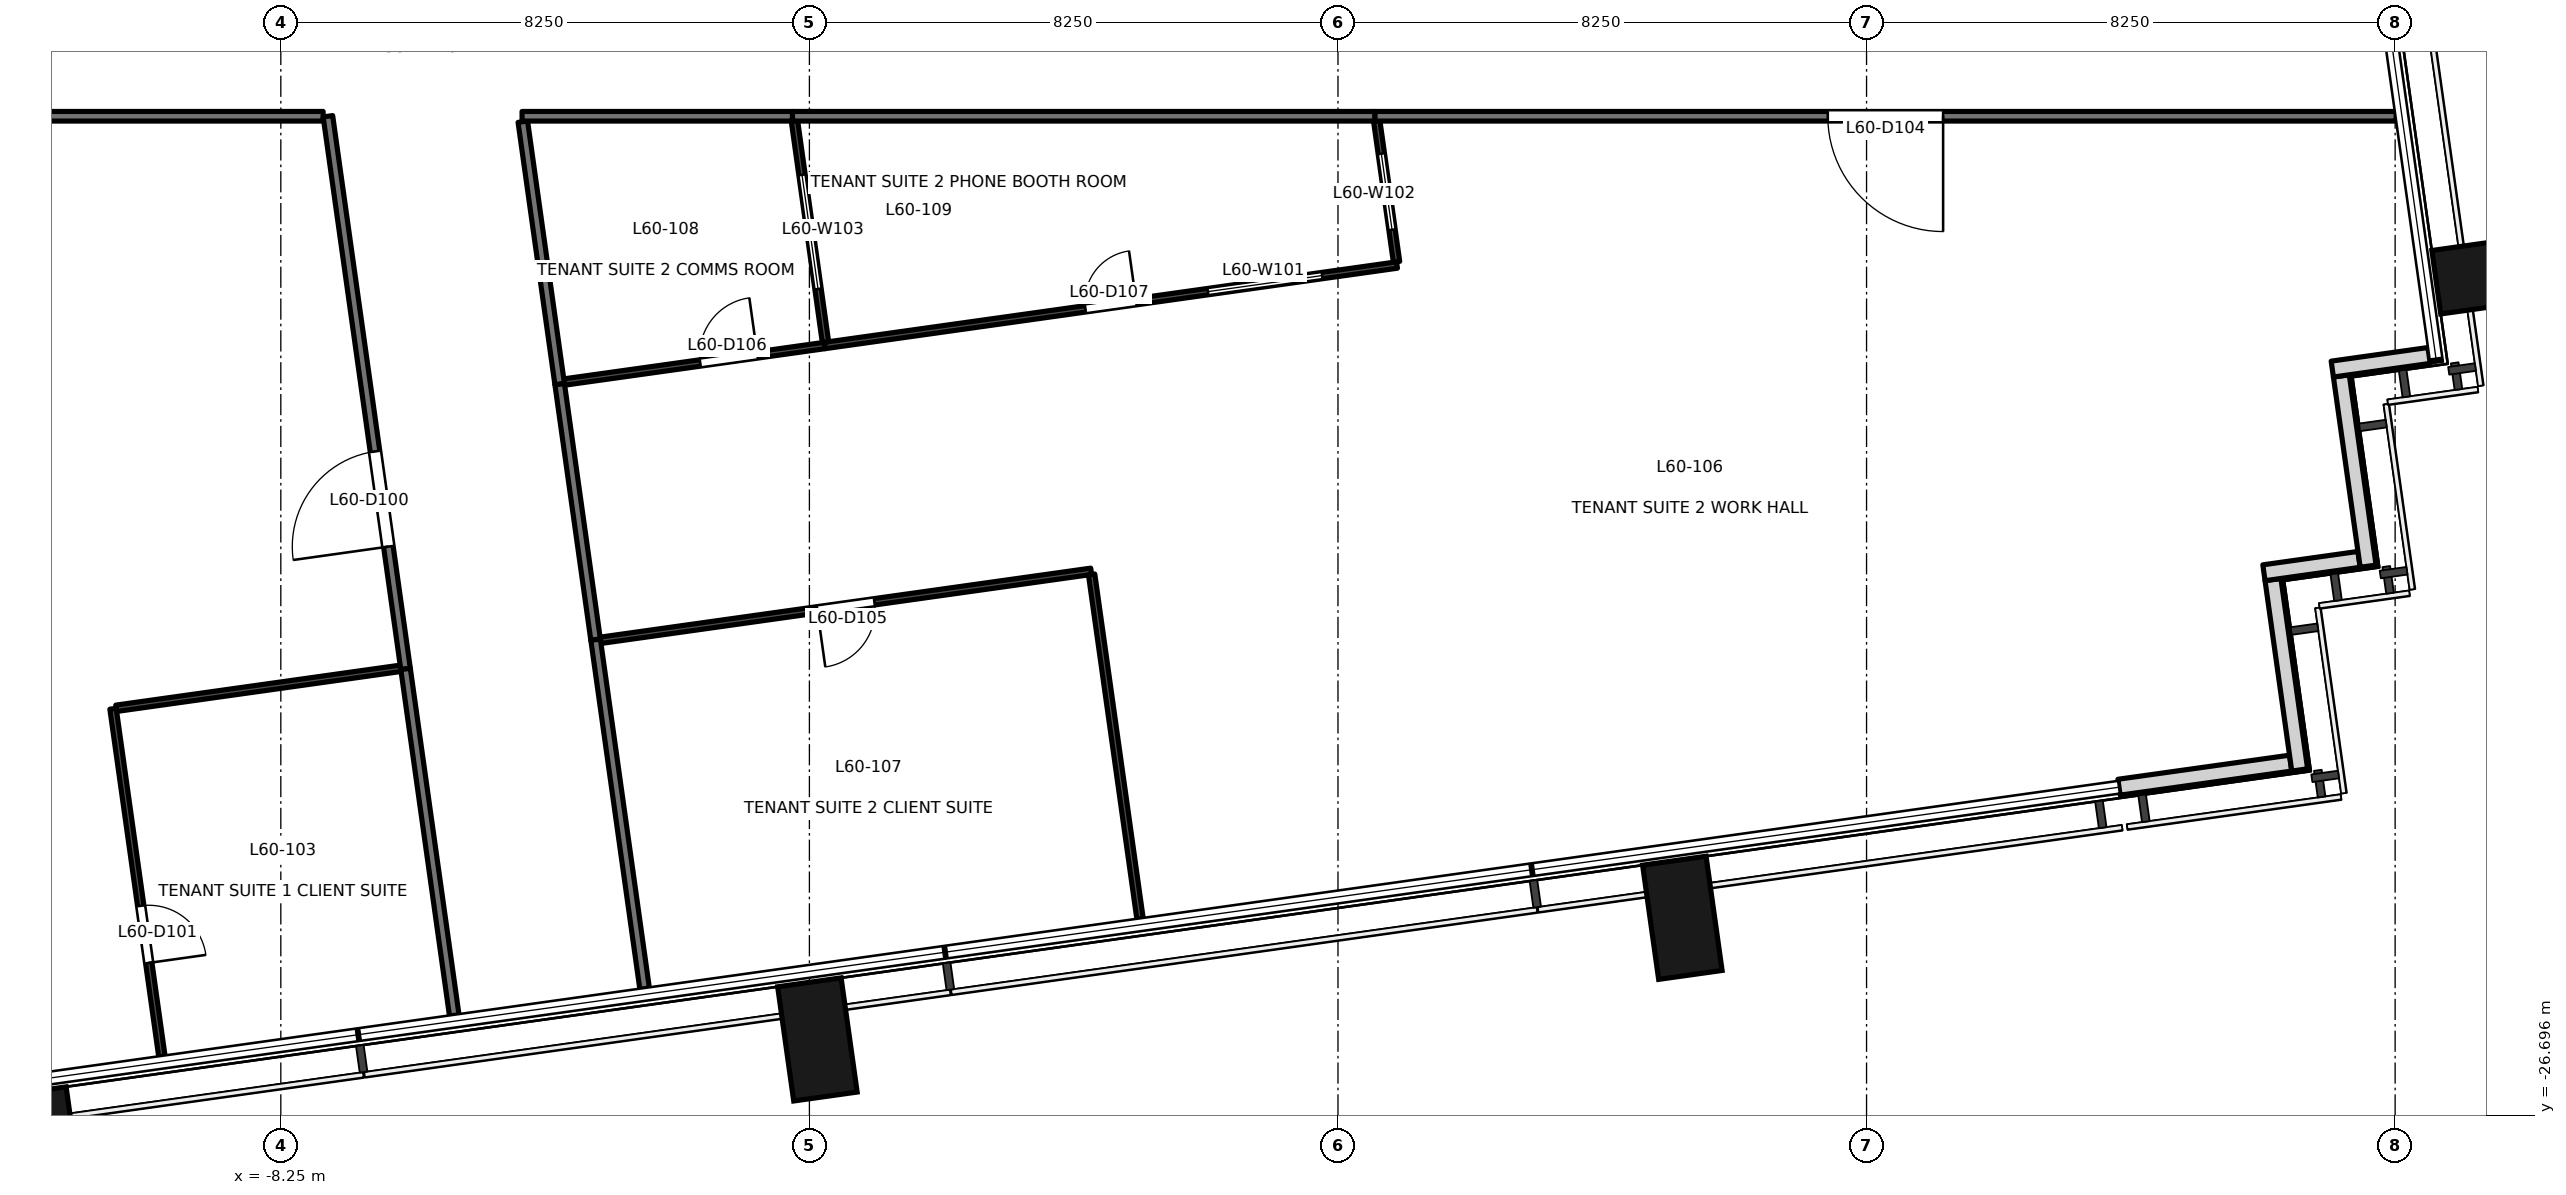
"""IFC4 building model, lengths in metres.
Left out: names, types, materials, properties, quantities, classifications, styles, units other than length and angle.
Written with IfcOpenShell. Run it as: python <this file> out.ifc"""

import sys

from ifc_helpers import new_model, si_unit, direction, frame, frame_2d, origin, origin_2d, place, context, subcontext, project, spatial, rectangle, extrude, element, fill, save


model = new_model("IFC4")
c1 = context("Model", 3, precision=1e-05, world=origin(), true_north=direction((0.0, 1.0)))
c2 = subcontext(c1, "Body", "Model", "MODEL_VIEW")
j1 = project(units=[si_unit("LENGTHUNIT", "METRE"), si_unit("PLANEANGLEUNIT", "RADIAN")], contexts=[c1])
p1 = place(None, origin())
s1 = spatial("IfcSite", under=j1, at=p1, CompositionType="ELEMENT")
p2 = place(p1, origin())
s2 = spatial("IfcBuilding", under=s1, at=p2, CompositionType="ELEMENT")
p3 = place(p2, frame((0.0, 0.0, 262.9)))
s3 = spatial("IfcBuildingStorey", under=s2, at=p3, CompositionType="ELEMENT", Elevation=262.9)
for number, where, z_axis, x_axis in (
    (1, (-11.971, -27.209, -0.2), (0.0, 0.0, 1.0), (0.99, 0.139, 0.0)),
    (2, (0.125, -25.508, -0.2), (0.0, 0.0, 1.0), (0.99, 0.139, 0.0)),
    (3, (13.625, -23.61, -0.2), (0.0, 0.0, 1.0), (0.99, 0.139, 0.0)),
    (4, (26.284, -13.565, -0.2), (0.0, 0.0, 1.0), (-0.139, 0.99, 0.0)),
):
    element("IfcColumn", number, at=place(p3, frame(where, z_axis=z_axis, x_axis=x_axis)), inside=s3, PredefinedType="COLUMN", context=c2, shape_type="SweptSolid", body=[
        extrude(rectangle(XDim=1.0, YDim=1.8, at=origin_2d()), origin(), (0.0, 0.0, 1.0), 3.9),
    ])
p4 = place(p3, frame((20.44, -21.572, 0.0), z_axis=(0.0, 0.0, 1.0), x_axis=(0.990293105353, 0.138994839796, 0.0)))
e5 = element("IfcWall", 5, at=p4, inside=s3, PredefinedType="SOLIDWALL", context=c2, shape_type="SweptSolid", body=[
    extrude(rectangle(XDim=2.705, YDim=0.25, at=frame_2d((1.353, 0.0))), origin(), (0.0, 0.0, 1.0), 3.7),
])
p5 = place(p3, frame((23.26, -21.302, 0.0), z_axis=(0.0, 0.0, 1.0), x_axis=(-0.138994228812, 0.990293191109, 0.0)))
e6 = element("IfcWall", 6, at=p5, inside=s3, PredefinedType="SOLIDWALL", context=c2, shape_type="SweptSolid", body=[
    extrude(rectangle(XDim=3.0, YDim=0.25, at=frame_2d((1.5, 0.0))), origin(), (0.0, 0.0, 1.0), 3.7),
])
p6 = place(p3, frame((22.702, -18.225, 0.0), z_axis=(0.0, 0.0, 1.0), x_axis=(0.990243596651, 0.13934711799, 0.0)))
e7 = element("IfcWall", 7, at=p6, inside=s3, PredefinedType="SOLIDWALL", context=c2, shape_type="SweptSolid", body=[
    extrude(rectangle(XDim=1.5, YDim=0.25, at=frame_2d((0.75, 0.0))), origin(), (0.0, 0.0, 1.0), 3.7),
])
p7 = place(p3, frame((24.328, -18.122, 0.0), z_axis=(0.0, 0.0, 1.0), x_axis=(-0.139358350296, 0.990242015975, 0.0)))
e8 = element("IfcWall", 8, at=p7, inside=s3, PredefinedType="SOLIDWALL", context=c2, shape_type="SweptSolid", body=[
    extrude(rectangle(XDim=2.999, YDim=0.25, at=frame_2d((1.5, 0.0))), origin(), (0.0, 0.0, 1.0), 3.7),
])
p8 = place(p3, frame((23.769, -15.046, 0.0), z_axis=(0.0, 0.0, 1.0), x_axis=(0.990260716096, 0.139225407725, 0.0)))
e9 = element("IfcWall", 9, at=p8, inside=s3, PredefinedType="SOLIDWALL", context=c2, shape_type="SweptSolid", body=[
    extrude(rectangle(XDim=1.526, YDim=0.25, at=frame_2d((0.763, 0.0))), origin(), (0.0, 0.0, 1.0), 3.7),
])
p9 = place(p3, frame((-7.589, -11.1, 0.0), z_axis=(0.0, 0.0, 1.0), x_axis=(-1.0, 0.0, 0.0)))
e10 = element("IfcWall", 10, at=p9, inside=s3, PredefinedType="PARTITIONING", context=c2, shape_type="SweptSolid", body=[
    extrude(rectangle(XDim=7.453, YDim=0.15, at=frame_2d((3.727, 0.0))), origin(), (0.0, 0.0, 1.0), 2.8),
])
p10 = place(p3, frame((-6.303, -19.726, 0.0), z_axis=(0.0, 0.0, 1.0), x_axis=(-0.139129433731, 0.990274204789, 0.0)))
e11 = element("IfcWall", 11, at=p10, inside=s3, PredefinedType="PARTITIONING", context=c2, shape_type="SweptSolid", body=[
    extrude(rectangle(XDim=8.711, YDim=0.15, at=frame_2d((4.355, 0.0))), origin(), (0.0, 0.0, 1.0), 3.7),
])
p11 = place(p10, frame((1.928, 0.0, 0.0)))
e12 = element("IfcOpeningElement", 12, at=p11, cuts=e11, PredefinedType="OPENING", context=c2, shape_type="SweptSolid", body=[
    extrude(rectangle(XDim=1.5, YDim=2.1, at=frame_2d((0.75, 1.05))), frame((0.0, 0.085, 0.0), z_axis=(0.0, -1.0, 0.0), x_axis=(1.0, 0.0, 0.0)), (0.0, 0.0, 1.0), 0.171),
])
p12 = place(p3, frame((-5.543, -25.133, 0.0), z_axis=(0.0, 0.0, 1.0), x_axis=(-0.139192487281, 0.990265343978, 0.0)))
e13 = element("IfcWall", 13, at=p12, inside=s3, PredefinedType="PARTITIONING", context=c2, shape_type="SweptSolid", body=[
    extrude(rectangle(XDim=5.46, YDim=0.15, at=frame_2d((2.73, 0.0))), origin(), (0.0, 0.0, 1.0), 3.7),
])
p13 = place(p3, frame((-3.898, -15.279, 0.0), z_axis=(0.0, 0.0, 1.0), x_axis=(0.139240905476, -0.990258537071, 0.0)))
e14 = element("IfcWall", 14, at=p13, inside=s3, PredefinedType="PARTITIONING", context=c2, shape_type="SweptSolid", body=[
    extrude(rectangle(XDim=4.029, YDim=0.15, at=frame_2d((2.015, 0.0))), origin(), (0.0, 0.0, 1.0), 3.7),
])
p14 = place(p3, frame((24.765, -11.1, 0.0), z_axis=(0.0, 0.0, 1.0), x_axis=(-1.0, 0.0, 0.0)))
e15 = element("IfcWall", 15, at=p14, inside=s3, PredefinedType="PARTITIONING", context=c2, shape_type="SweptSolid", body=[
    extrude(rectangle(XDim=15.941, YDim=0.15, at=frame_2d((7.97, 0.0))), origin(), (0.0, 0.0, 1.0), 3.0),
])
p15 = place(p14, frame((7.07, 0.0, 0.0)))
e16 = element("IfcOpeningElement", 16, at=p15, cuts=e15, PredefinedType="OPENING", context=c2, shape_type="SweptSolid", body=[
    extrude(rectangle(XDim=1.8, YDim=2.1, at=frame_2d((0.9, 1.05))), frame((0.0, 0.085, 0.0), z_axis=(0.0, -1.0, 0.0), x_axis=(1.0, 0.0, 0.0)), (0.0, 0.0, 1.0), 0.171),
])
p16 = place(p3, frame((-3.337, -19.269, 0.0), z_axis=(0.0, 0.0, 1.0), x_axis=(0.139059647431, -0.990284006968, 0.0)))
e17 = element("IfcWall", 17, at=p16, inside=s3, PredefinedType="PARTITIONING", context=c2, shape_type="SweptSolid", body=[
    extrude(rectangle(XDim=5.5, YDim=0.15, at=frame_2d((2.75, 0.0))), origin(), (0.0, 0.0, 1.0), 3.7),
])
p17 = place(p3, frame((-4.473, -11.185, 0.0), z_axis=(0.0, 0.0, 1.0), x_axis=(0.1390729581, -0.990282137739, 0.0)))
e18 = element("IfcWall", 18, at=p17, inside=s3, PredefinedType="PARTITIONING", context=c2, shape_type="SweptSolid", body=[
    extrude(rectangle(XDim=4.134, YDim=0.15, at=frame_2d((2.067, 0.0))), origin(), (0.0, 0.0, 1.0), 2.8),
])
p18 = place(p3, frame((-0.264, -11.1, 0.0), z_axis=(0.0, 0.0, 1.0), x_axis=(-1.0, 0.0, 0.0)))
e19 = element("IfcWall", 19, at=p18, inside=s3, PredefinedType="PARTITIONING", context=c2, shape_type="SweptSolid", body=[
    extrude(rectangle(XDim=4.221, YDim=0.15, at=frame_2d((2.111, 0.0))), origin(), (0.0, 0.0, 1.0), 2.8),
])
p19 = place(p3, frame((8.824, -11.1, 0.0), z_axis=(0.0, 0.0, 1.0), x_axis=(-1.0, 0.0, 0.0)))
e20 = element("IfcWall", 20, at=p19, inside=s3, PredefinedType="PARTITIONING", context=c2, shape_type="SweptSolid", body=[
    extrude(rectangle(XDim=9.088, YDim=0.15, at=frame_2d((4.544, 0.0))), origin(), (0.0, 0.0, 1.0), 2.9),
])
p20 = place(p3, frame((-10.869, -20.347, 0.0), z_axis=(0.0, 0.0, 1.0), x_axis=(0.139213194633, -0.990262433116, 0.0)))
e21 = element("IfcWall", 21, at=p20, inside=s3, PredefinedType="PARTITIONING", context=c2, shape_type="SweptSolid", body=[
    extrude(rectangle(XDim=5.48, YDim=0.1, at=frame_2d((2.74, 0.0))), origin(), (0.0, 0.0, 1.0), 3.7),
])
p21 = place(p20, frame((3.106, 0.0, 0.0)))
e22 = element("IfcOpeningElement", 22, at=p21, cuts=e21, PredefinedType="OPENING", context=c2, shape_type="SweptSolid", body=[
    extrude(rectangle(XDim=0.9, YDim=2.1, at=frame_2d((0.45, 1.05))), frame((0.0, 0.061, 0.0), z_axis=(0.0, -1.0, 0.0), x_axis=(1.0, 0.0, 0.0)), (0.0, 0.0, 1.0), 0.121),
])
p22 = place(p3, frame((-6.38, -19.716, 0.0), z_axis=(0.0, 0.0, 1.0), x_axis=(-0.990263970159, -0.139202260778, 0.0)))
e23 = element("IfcWall", 23, at=p22, inside=s3, PredefinedType="PARTITIONING", context=c2, shape_type="SweptSolid", body=[
    extrude(rectangle(XDim=4.483, YDim=0.1, at=frame_2d((2.241, 0.0))), origin(), (0.0, 0.0, 1.0), 2.8),
])
p23 = place(p3, frame((4.398, -18.202, 0.0), z_axis=(0.0, 0.0, 1.0), x_axis=(-0.990252156894, -0.139286272714, 0.0)))
e24 = element("IfcWall", 24, at=p23, inside=s3, PredefinedType="PARTITIONING", context=c2, shape_type="SweptSolid", body=[
    extrude(rectangle(XDim=7.733, YDim=0.1, at=frame_2d((3.867, 0.0))), origin(), (0.0, 0.0, 1.0), 2.9),
])
p24 = place(p23, frame((3.417, 0.0, 0.0)))
e25 = element("IfcOpeningElement", 25, at=p24, cuts=e24, PredefinedType="OPENING", context=c2, shape_type="SweptSolid", body=[
    extrude(rectangle(XDim=0.9, YDim=2.1, at=frame_2d((0.45, 1.05))), frame((0.0, 0.061, 0.0), z_axis=(0.0, -1.0, 0.0), x_axis=(1.0, 0.0, 0.0)), (0.0, 0.0, 1.0), 0.121),
])
p25 = place(p3, frame((5.161, -23.628, 0.0), z_axis=(0.0, 0.0, 1.0), x_axis=(-0.139205228836, 0.990263552932, 0.0)))
e26 = element("IfcWall", 26, at=p25, inside=s3, PredefinedType="PARTITIONING", context=c2, shape_type="SweptSolid", body=[
    extrude(rectangle(XDim=5.43, YDim=0.1, at=frame_2d((2.715, 0.0))), origin(), (0.0, 0.0, 1.0), 2.9),
])
p26 = place(p3, frame((-3.826, -15.248, 0.0), z_axis=(0.0, 0.0, 1.0), x_axis=(0.990304461309, 0.138913908276, 0.0)))
e27 = element("IfcWall", 27, at=p26, inside=s3, PredefinedType="PARTITIONING", context=c2, shape_type="SweptSolid", body=[
    extrude(rectangle(XDim=4.104, YDim=0.1, at=frame_2d((2.052, 0.0))), origin(), (0.0, 0.0, 1.0), 2.9),
])
p27 = place(p26, frame((2.143, 0.0, 0.0)))
e28 = element("IfcOpeningElement", 28, at=p27, cuts=e27, PredefinedType="OPENING", context=c2, shape_type="SweptSolid", body=[
    extrude(rectangle(XDim=0.9, YDim=2.1, at=frame_2d((0.45, 1.05))), frame((0.0, 0.061, 0.0), z_axis=(0.0, -1.0, 0.0), x_axis=(1.0, 0.0, 0.0)), (0.0, 0.0, 1.0), 0.121),
])
p28 = place(p3, frame((0.238, -14.678, 0.0), z_axis=(0.0, 0.0, 1.0), x_axis=(0.990261534953, 0.139219583367, 0.0)))
e29 = element("IfcWall", 29, at=p28, inside=s3, PredefinedType="PARTITIONING", context=c2, shape_type="SweptSolid", body=[
    extrude(rectangle(XDim=9.021, YDim=0.1, at=frame_2d((4.51, 0.0))), origin(), (0.0, 0.0, 1.0), 2.9),
])
p29 = place(p28, frame((4.11, 0.0, 0.0)))
e30 = element("IfcOpeningElement", 30, at=p29, cuts=e29, PredefinedType="OPENING", context=c2, shape_type="SweptSolid", body=[
    extrude(rectangle(XDim=0.8, YDim=2.1, at=frame_2d((0.4, 1.05))), frame((0.0, 0.061, 0.0), z_axis=(0.0, -1.0, 0.0), x_axis=(1.0, 0.0, 0.0)), (0.0, 0.0, 1.0), 0.121),
])
p30 = place(p28, frame((6.041, 0.0, 0.9)))
e31 = element("IfcOpeningElement", 31, at=p30, cuts=e29, PredefinedType="OPENING", context=c2, shape_type="SweptSolid", body=[
    extrude(rectangle(XDim=1.8, YDim=1.2, at=frame_2d((0.9, 0.6))), frame((0.0, 0.061, 0.0), z_axis=(0.0, -1.0, 0.0), x_axis=(1.0, 0.0, 0.0)), (0.0, 0.0, 1.0), 0.121),
])
p31 = place(p3, frame((9.164, -13.372, 0.0), z_axis=(0.0, 0.0, 1.0), x_axis=(-0.139301888521, 0.99024996029, 0.0)))
e32 = element("IfcWall", 32, at=p31, inside=s3, PredefinedType="PARTITIONING", context=c2, shape_type="SweptSolid", body=[
    extrude(rectangle(XDim=2.226, YDim=0.1, at=frame_2d((1.113, 0.0))), origin(), (0.0, 0.0, 1.0), 3.0),
])
p32 = place(p31, frame((0.505, 0.0, 0.9)))
e33 = element("IfcOpeningElement", 33, at=p32, cuts=e32, PredefinedType="OPENING", context=c2, shape_type="SweptSolid", body=[
    extrude(rectangle(XDim=1.2, YDim=1.2, at=frame_2d((0.6, 0.6))), frame((0.0, 0.061, 0.0), z_axis=(0.0, -1.0, 0.0), x_axis=(1.0, 0.0, 0.0)), (0.0, 0.0, 1.0), 0.121),
])
p33 = place(p3, frame((-0.234, -11.168, 0.0), z_axis=(0.0, 0.0, 1.0), x_axis=(0.138894773338, -0.990307145253, 0.0)))
e34 = element("IfcWall", 34, at=p33, inside=s3, PredefinedType="PARTITIONING", context=c2, shape_type="SweptSolid", body=[
    extrude(rectangle(XDim=3.491, YDim=0.1, at=frame_2d((1.746, 0.0))), origin(), (0.0, 0.0, 1.0), 2.9),
])
p34 = place(p33, frame((0.854, 0.0, 0.9)))
e35 = element("IfcOpeningElement", 35, at=p34, cuts=e34, PredefinedType="OPENING", context=c2, shape_type="SweptSolid", body=[
    extrude(rectangle(XDim=1.8, YDim=1.2, at=frame_2d((0.9, 0.6))), frame((0.0, 0.061, 0.0), z_axis=(0.0, -1.0, 0.0), x_axis=(1.0, 0.0, 0.0)), (0.0, 0.0, 1.0), 0.121),
])
p35 = place(p11, origin())
e36 = element("IfcDoor", 36, at=p35, inside=s3, OperationType="DOUBLE_DOOR_SINGLE_SWING", PredefinedType="DOOR", context=c2, shape_type="SweptSolid", body=[
    extrude(rectangle(XDim=1.5, YDim=2.1, at=frame_2d((0.75, 1.05))), frame((0.0, 0.025, 0.0), z_axis=(0.0, -1.0, 0.0), x_axis=(1.0, 0.0, 0.0)), (0.0, 0.0, 1.0), 0.05),
])
fill(e12, e36)
p36 = place(p21, origin())
e37 = element("IfcDoor", 37, at=p36, inside=s3, OperationType="SINGLE_SWING_RIGHT", PredefinedType="DOOR", context=c2, shape_type="SweptSolid", body=[
    extrude(rectangle(XDim=0.9, YDim=2.1, at=frame_2d((0.45, 1.05))), frame((0.0, 0.025, 0.0), z_axis=(0.0, -1.0, 0.0), x_axis=(1.0, 0.0, 0.0)), (0.0, 0.0, 1.0), 0.05),
])
fill(e22, e37)
p37 = place(p15, origin())
e38 = element("IfcDoor", 38, at=p37, inside=s3, OperationType="DOUBLE_DOOR_SINGLE_SWING", PredefinedType="DOOR", context=c2, shape_type="SweptSolid", body=[
    extrude(rectangle(XDim=1.8, YDim=2.1, at=frame_2d((0.9, 1.05))), frame((0.0, 0.025, 0.0), z_axis=(0.0, -1.0, 0.0), x_axis=(1.0, 0.0, 0.0)), (0.0, 0.0, 1.0), 0.05),
])
fill(e16, e38)
p38 = place(p24, origin())
e39 = element("IfcDoor", 39, at=p38, inside=s3, OperationType="SINGLE_SWING_RIGHT", PredefinedType="DOOR", context=c2, shape_type="SweptSolid", body=[
    extrude(rectangle(XDim=0.9, YDim=2.1, at=frame_2d((0.45, 1.05))), frame((0.0, 0.025, 0.0), z_axis=(0.0, -1.0, 0.0), x_axis=(1.0, 0.0, 0.0)), (0.0, 0.0, 1.0), 0.05),
])
fill(e25, e39)
p39 = place(p27, origin())
e40 = element("IfcDoor", 40, at=p39, inside=s3, OperationType="SINGLE_SWING_RIGHT", PredefinedType="DOOR", context=c2, shape_type="SweptSolid", body=[
    extrude(rectangle(XDim=0.9, YDim=2.1, at=frame_2d((0.45, 1.05))), frame((0.0, 0.025, 0.0), z_axis=(0.0, -1.0, 0.0), x_axis=(1.0, 0.0, 0.0)), (0.0, 0.0, 1.0), 0.05),
])
fill(e28, e40)
p40 = place(p29, origin())
e41 = element("IfcDoor", 41, at=p40, inside=s3, OperationType="SINGLE_SWING_RIGHT", PredefinedType="DOOR", context=c2, shape_type="SweptSolid", body=[
    extrude(rectangle(XDim=0.8, YDim=2.1, at=frame_2d((0.4, 1.05))), frame((0.0, 0.025, 0.0), z_axis=(0.0, -1.0, 0.0), x_axis=(1.0, 0.0, 0.0)), (0.0, 0.0, 1.0), 0.05),
])
fill(e30, e41)
p41 = place(p30, origin())
e42 = element("IfcWindow", 42, at=p41, inside=s3, PartitioningType="SINGLE_PANEL", PredefinedType="WINDOW", context=c2, shape_type="SweptSolid", body=[
    extrude(rectangle(XDim=1.8, YDim=1.2, at=frame_2d((0.9, 0.6))), frame((0.0, 0.03, 0.0), z_axis=(0.0, -1.0, 0.0), x_axis=(1.0, 0.0, 0.0)), (0.0, 0.0, 1.0), 0.06),
])
fill(e31, e42)
p42 = place(p32, origin())
e43 = element("IfcWindow", 43, at=p42, inside=s3, PartitioningType="SINGLE_PANEL", PredefinedType="WINDOW", context=c2, shape_type="SweptSolid", body=[
    extrude(rectangle(XDim=1.2, YDim=1.2, at=frame_2d((0.6, 0.6))), frame((0.0, 0.03, 0.0), z_axis=(0.0, -1.0, 0.0), x_axis=(1.0, 0.0, 0.0)), (0.0, 0.0, 1.0), 0.06),
])
fill(e33, e43)
p43 = place(p34, origin())
e44 = element("IfcWindow", 44, at=p43, inside=s3, PartitioningType="SINGLE_PANEL", PredefinedType="WINDOW", context=c2, shape_type="SweptSolid", body=[
    extrude(rectangle(XDim=1.8, YDim=1.2, at=frame_2d((0.9, 0.6))), frame((0.0, 0.03, 0.0), z_axis=(0.0, -1.0, 0.0), x_axis=(1.0, 0.0, 0.0)), (0.0, 0.0, 1.0), 0.06),
])
fill(e35, e44)
save(model, sys.argv[1])
